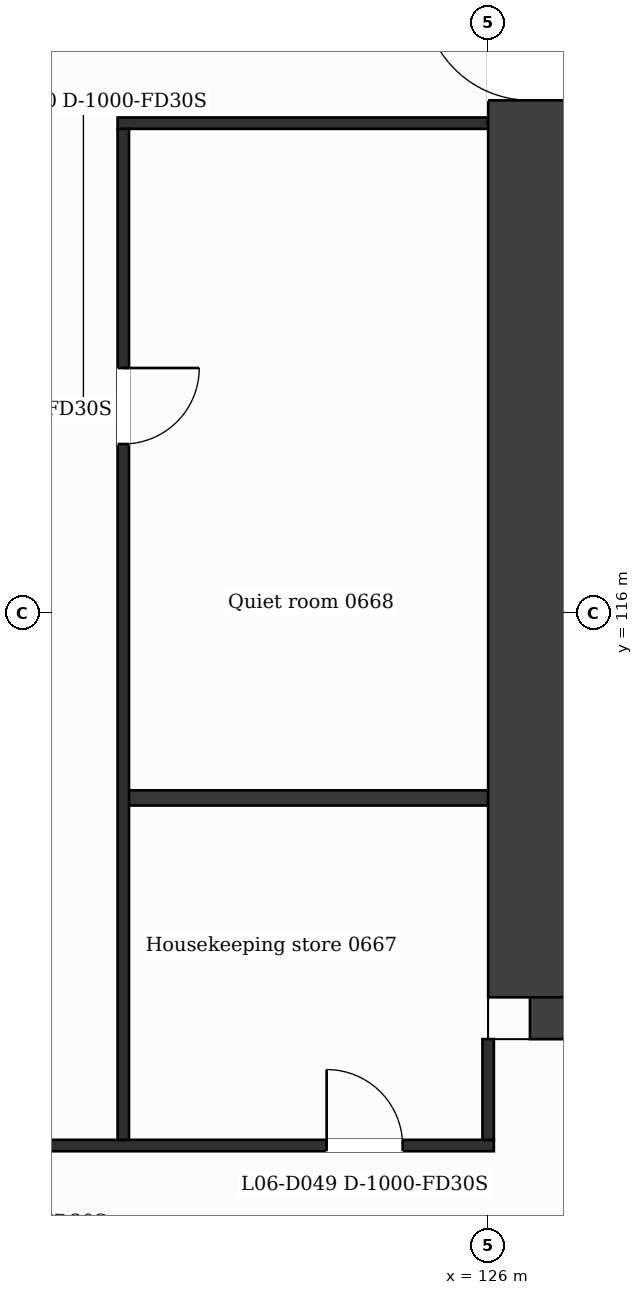
"""IFC4 building model, lengths in metres.
Left out: names, types, materials, properties, quantities, classifications, styles, units other than length and angle.
Written with IfcOpenShell. Run it as: python <this file> out.ifc"""

import sys

from ifc_helpers import new_model, si_unit, direction, frame, frame_2d, origin, place, context, subcontext, project, spatial, rectangle, extrude, element, fill, save


model = new_model("IFC4")
c1 = context("Model", 3, precision=1e-05, world=origin(), true_north=direction((0.0, 1.0)))
c2 = subcontext(c1, "Body", "Model", "MODEL_VIEW")
j1 = project(units=[si_unit("LENGTHUNIT", "METRE"), si_unit("PLANEANGLEUNIT", "RADIAN")], contexts=[c1])
p1 = place(None, origin())
s1 = spatial("IfcSite", under=j1, at=p1, CompositionType="ELEMENT")
p2 = place(p1, origin())
s2 = spatial("IfcBuilding", under=s1, at=p2, CompositionType="ELEMENT")
p3 = place(p2, frame((0.0, 0.0, 39.0)))
s3 = spatial("IfcBuildingStorey", under=s2, at=p3, CompositionType="ELEMENT", Elevation=39.0)
p4 = place(p3, frame((140.502, 110.95, 0.0), z_axis=(0.0, 0.0, 1.0), x_axis=(-1.0, 0.0, 0.0)))
e1 = element("IfcWall", 1, at=p4, inside=s3, PredefinedType="SHEAR", context=c2, shape_type="SweptSolid", body=[
    extrude(rectangle(XDim=13.952, YDim=1.1, at=frame_2d((6.976, 0.0))), origin(), (0.0, 0.0, 1.0), 3.5),
])
p5 = place(p4, frame((6.804, 0.0, 0.0)))
e2 = element("IfcOpeningElement", 2, at=p5, cuts=e1, PredefinedType="OPENING", context=c2, shape_type="SweptSolid", body=[
    extrude(rectangle(XDim=1.4, YDim=2.1, at=frame_2d((0.7, 1.05))), frame((0.0, 0.56, 0.0), z_axis=(0.0, -1.0, 0.0), x_axis=(1.0, 0.0, 0.0)), (0.0, 0.0, 1.0), 1.12),
])
p6 = place(p3, frame((126.55, 110.95, 0.0), z_axis=(0.0, 0.0, 1.0), x_axis=(0.0, 1.0, 0.0)))
e3 = element("IfcWall", 3, at=p6, inside=s3, PredefinedType="SHEAR", context=c2, shape_type="SweptSolid", body=[
    extrude(rectangle(XDim=20.9, YDim=1.1, at=frame_2d((10.45, 0.0))), origin(), (0.0, 0.0, 1.0), 3.5),
])
p7 = place(p6, frame((11.8, 0.0, 0.0)))
e4 = element("IfcOpeningElement", 4, at=p7, cuts=e3, PredefinedType="OPENING", context=c2, shape_type="SweptSolid", body=[
    extrude(rectangle(XDim=1.4, YDim=2.1, at=frame_2d((0.7, 1.05))), frame((0.0, 0.56, 0.0), z_axis=(0.0, -1.0, 0.0), x_axis=(1.0, 0.0, 0.0)), (0.0, 0.0, 1.0), 1.12),
])
p8 = place(p3, frame((100.725, 109.0, 0.0), z_axis=(0.0, 0.0, 1.0), x_axis=(1.0, 0.0, 0.0)))
e5 = element("IfcWall", 5, at=p8, inside=s3, PredefinedType="PARTITIONING", context=c2, shape_type="SweptSolid", body=[
    extrude(rectangle(XDim=25.35, YDim=0.15, at=frame_2d((12.675, 0.0))), origin(), (0.0, 0.0, 1.0), 3.18),
])
p9 = place(p8, frame((1.2, 0.0, 0.0)))
e6 = element("IfcOpeningElement", 6, at=p9, cuts=e5, PredefinedType="OPENING", context=c2, shape_type="SweptSolid", body=[
    extrude(rectangle(XDim=1.0, YDim=2.1, at=frame_2d((0.5, 1.05))), frame((0.0, 0.085, 0.0), z_axis=(0.0, -1.0, 0.0), x_axis=(1.0, 0.0, 0.0)), (0.0, 0.0, 1.0), 0.17),
])
p10 = place(p8, frame((12.845, 0.0, 0.0)))
e7 = element("IfcOpeningElement", 7, at=p10, cuts=e5, PredefinedType="OPENING", context=c2, shape_type="SweptSolid", body=[
    extrude(rectangle(XDim=1.0, YDim=2.1, at=frame_2d((0.5, 1.05))), frame((0.0, 0.085, 0.0), z_axis=(0.0, -1.0, 0.0), x_axis=(1.0, 0.0, 0.0)), (0.0, 0.0, 1.0), 0.17),
])
p11 = place(p8, frame((23.15, 0.0, 0.0)))
e8 = element("IfcOpeningElement", 8, at=p11, cuts=e5, PredefinedType="OPENING", context=c2, shape_type="SweptSolid", body=[
    extrude(rectangle(XDim=1.0, YDim=2.1, at=frame_2d((0.5, 1.05))), frame((0.0, 0.085, 0.0), z_axis=(0.0, -1.0, 0.0), x_axis=(1.0, 0.0, 0.0)), (0.0, 0.0, 1.0), 0.17),
])
p12 = place(p3, frame((121.2, 113.573, 0.0), z_axis=(0.0, 0.0, 1.0), x_axis=(1.0, 0.0, 0.0)))
e9 = element("IfcWall", 9, at=p12, inside=s3, PredefinedType="PARTITIONING", context=c2, shape_type="SweptSolid", body=[
    extrude(rectangle(XDim=4.8, YDim=0.2, at=frame_2d((2.4, 0.0))), origin(), (0.0, 0.0, 1.0), 3.18),
])
p13 = place(p3, frame((121.125, 122.45, 0.0), z_axis=(0.0, 0.0, 1.0), x_axis=(1.0, 0.0, 0.0)))
e10 = element("IfcWall", 10, at=p13, inside=s3, PredefinedType="PARTITIONING", context=c2, shape_type="SweptSolid", body=[
    extrude(rectangle(XDim=4.875, YDim=0.15, at=frame_2d((2.438, 0.0))), origin(), (0.0, 0.0, 1.0), 3.18),
])
p14 = place(p3, frame((121.2, 109.075, 0.0), z_axis=(0.0, 0.0, 1.0), x_axis=(0.0, 1.0, 0.0)))
e11 = element("IfcWall", 11, at=p14, inside=s3, PredefinedType="PARTITIONING", context=c2, shape_type="SweptSolid", body=[
    extrude(rectangle(XDim=13.3, YDim=0.15, at=frame_2d((6.65, 0.0))), origin(), (0.0, 0.0, 1.0), 3.18),
])
p15 = place(p14, frame((9.154, 0.0, 0.0)))
e12 = element("IfcOpeningElement", 12, at=p15, cuts=e11, PredefinedType="OPENING", context=c2, shape_type="SweptSolid", body=[
    extrude(rectangle(XDim=1.0, YDim=2.1, at=frame_2d((0.5, 1.05))), frame((0.0, 0.085, 0.0), z_axis=(0.0, -1.0, 0.0), x_axis=(1.0, 0.0, 0.0)), (0.0, 0.0, 1.0), 0.17),
])
p16 = place(p3, frame((126.0, 109.075, 0.0), z_axis=(0.0, 0.0, 1.0), x_axis=(0.0, 1.0, 0.0)))
e13 = element("IfcWall", 13, at=p16, inside=s3, PredefinedType="PARTITIONING", context=c2, shape_type="SweptSolid", body=[
    extrude(rectangle(XDim=1.325, YDim=0.15, at=frame_2d((0.663, 0.0))), origin(), (0.0, 0.0, 1.0), 3.18),
])
p17 = place(p11, origin())
e14 = element("IfcDoor", 14, at=p17, inside=s3, OperationType="SINGLE_SWING_LEFT", PredefinedType="DOOR", context=c2, shape_type="SweptSolid", body=[
    extrude(rectangle(XDim=1.0, YDim=2.1, at=frame_2d((0.5, 1.05))), frame((0.0, 0.025, 0.0), z_axis=(0.0, -1.0, 0.0), x_axis=(1.0, 0.0, 0.0)), (0.0, 0.0, 1.0), 0.05),
])
fill(e8, e14)
p18 = place(p15, origin())
e15 = element("IfcDoor", 15, at=p18, inside=s3, OperationType="SINGLE_SWING_RIGHT", PredefinedType="DOOR", context=c2, shape_type="SweptSolid", body=[
    extrude(rectangle(XDim=1.0, YDim=2.1, at=frame_2d((0.5, 1.05))), frame((0.0, 0.025, 0.0), z_axis=(0.0, -1.0, 0.0), x_axis=(1.0, 0.0, 0.0)), (0.0, 0.0, 1.0), 0.05),
])
fill(e12, e15)
p19 = place(p7, origin())
e16 = element("IfcDoor", 16, at=p19, inside=s3, OperationType="SINGLE_SWING_RIGHT", PredefinedType="DOOR", context=c2, shape_type="SweptSolid", body=[
    extrude(rectangle(XDim=1.4, YDim=2.1, at=frame_2d((0.7, 1.05))), frame((0.0, 0.025, 0.0), z_axis=(0.0, -1.0, 0.0), x_axis=(1.0, 0.0, 0.0)), (0.0, 0.0, 1.0), 0.05),
])
fill(e4, e16)
save(model, sys.argv[1])
